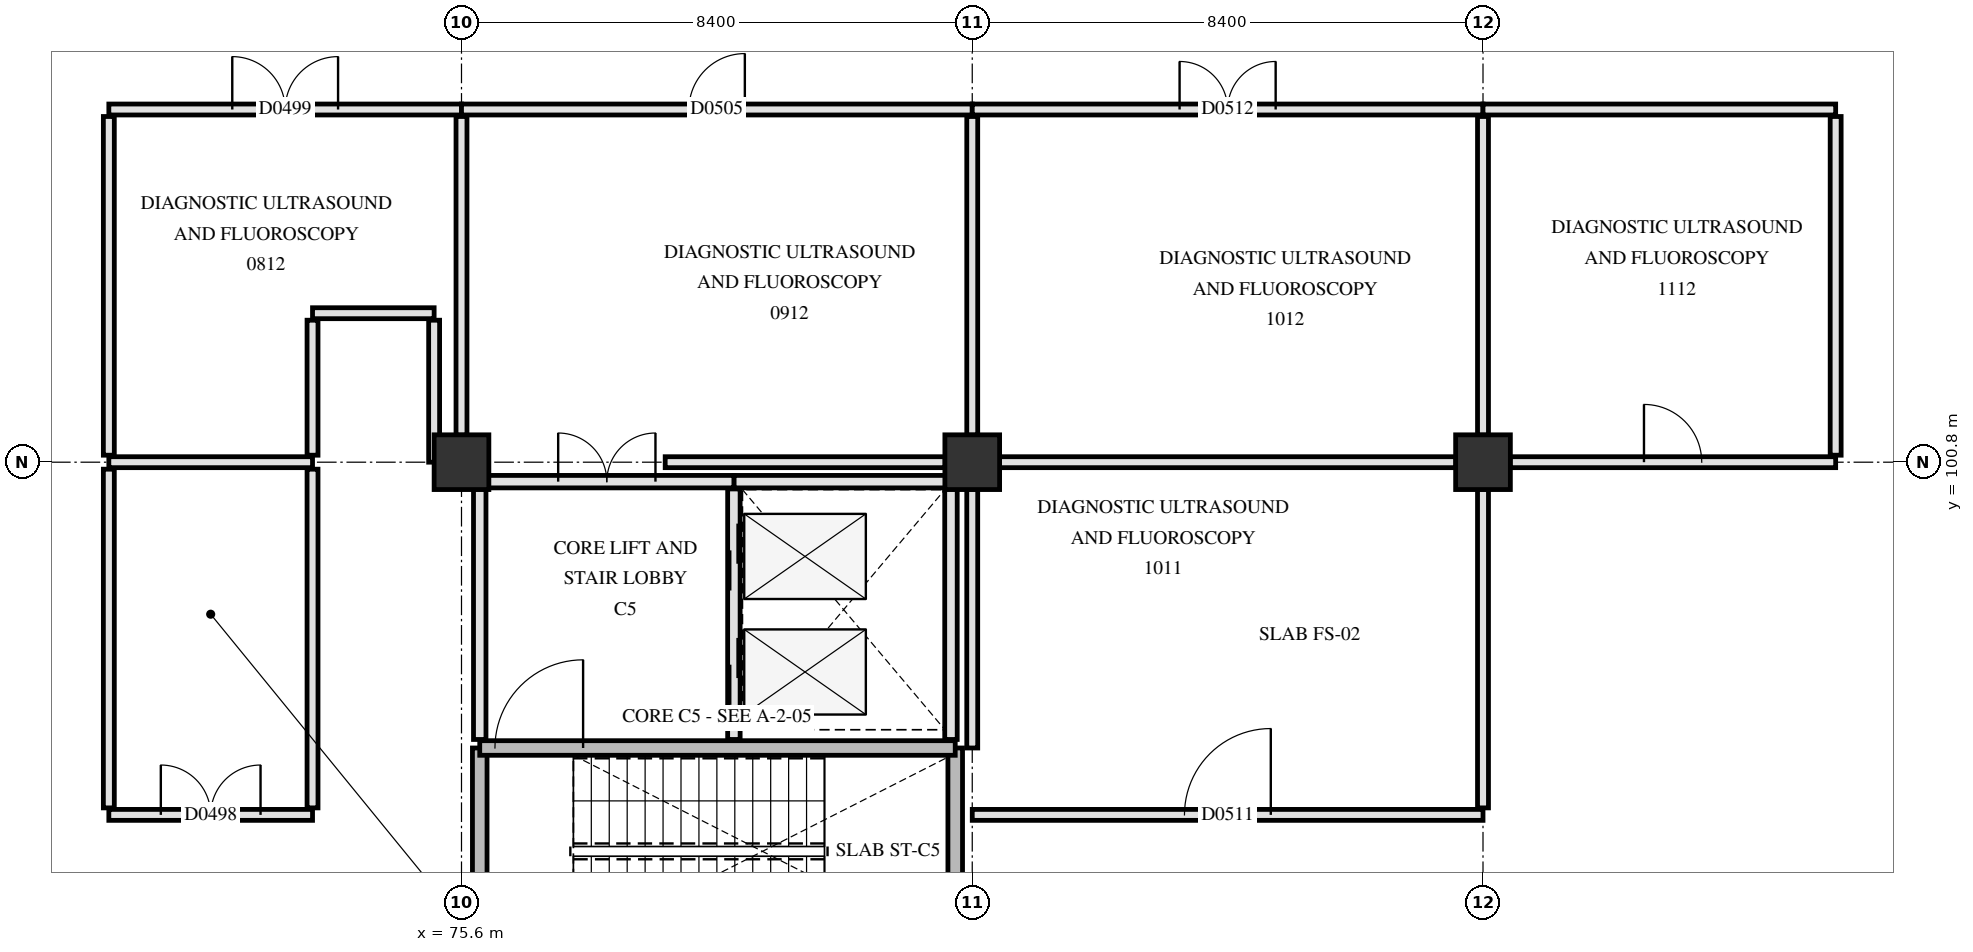
"""IFC4 building model, lengths in metres.
Left out: names, types, materials, properties, quantities, classifications, styles, units other than length and angle.
Written with IfcOpenShell. Run it as: python <this file> out.ifc"""

import sys

from ifc_helpers import new_model, si_unit, direction, frame, frame_2d, origin, origin_2d, place, context, subcontext, project, spatial, rectangle, extrude, element, fill, save


model = new_model("IFC4")
c1 = context("Model", 3, precision=1e-05, world=origin(), true_north=direction((0.0, 1.0)))
c2 = subcontext(c1, "Body", "Model", "MODEL_VIEW")
j1 = project(units=[si_unit("LENGTHUNIT", "METRE"), si_unit("PLANEANGLEUNIT", "RADIAN")], contexts=[c1])
p1 = place(None, origin())
s1 = spatial("IfcSite", under=j1, at=p1, CompositionType="ELEMENT")
p2 = place(p1, origin())
s2 = spatial("IfcBuilding", under=s1, at=p2, CompositionType="ELEMENT")
p3 = place(p2, origin())
s3 = spatial("IfcBuildingStorey", under=s2, at=p3, CompositionType="ELEMENT", Elevation=0.0)
for number, where, z_axis, x_axis in (
    (1, (75.6, 100.8, 0.0), (0.0, 0.0, 1.0), (1.0, 0.0, 0.0)),
    (2, (84.0, 100.8, 0.0), (0.0, 0.0, 1.0), (1.0, 0.0, 0.0)),
    (3, (92.4, 100.8, 0.0), (0.0, 0.0, 1.0), (1.0, 0.0, 0.0)),
):
    element("IfcColumn", number, at=place(p3, frame(where, z_axis=z_axis, x_axis=x_axis)), inside=s3, PredefinedType="COLUMN", context=c2, shape_type="SweptSolid", body=[
        extrude(rectangle(XDim=0.9, YDim=0.9, at=origin_2d()), origin(), (0.0, 0.0, 1.0), 4.8),
    ])
for number, where, z_axis, x_axis in (
    (4, (75.9, 92.78, 0.0), (0.0, 0.0, 1.0), (0.0, 1.0, 0.0)),
    (5, (83.72, 92.78, 0.0), (0.0, 0.0, 1.0), (0.0, 1.0, 0.0)),
):
    element("IfcWall", number, at=place(p3, frame(where, z_axis=z_axis, x_axis=x_axis)), inside=s3, PredefinedType="SHEAR", context=c2, shape_type="SweptSolid", body=[
        extrude(rectangle(XDim=3.32, YDim=0.24, at=frame_2d((1.66, 0.0))), origin(), (0.0, 0.0, 1.0), 4.5),
    ])
p4 = place(p3, frame((75.9, 96.1, 0.0), z_axis=(0.0, 0.0, 1.0), x_axis=(1.0, 0.0, 0.0)))
e6 = element("IfcWall", 6, at=p4, inside=s3, PredefinedType="SHEAR", context=c2, shape_type="SweptSolid", body=[
    extrude(rectangle(XDim=7.82, YDim=0.24, at=frame_2d((3.91, 0.0))), origin(), (0.0, 0.0, 1.0), 4.5),
])
p5 = place(p4, frame((0.25, 0.0, 0.0)))
e7 = element("IfcOpeningElement", 7, at=p5, cuts=e6, PredefinedType="OPENING", context=c2, shape_type="SweptSolid", body=[
    extrude(rectangle(XDim=1.45, YDim=2.2, at=frame_2d((0.725, 1.1))), frame((0.0, 0.13, 0.0), z_axis=(0.0, -1.0, 0.0), x_axis=(1.0, 0.0, 0.0)), (0.0, 0.0, 1.0), 0.26),
])
p6 = place(p3, frame((80.08, 96.24, 0.0), z_axis=(0.0, 0.0, 1.0), x_axis=(0.0, 1.0, 0.0)))
e8 = element("IfcWall", 8, at=p6, inside=s3, PredefinedType="PARTITIONING", context=c2, shape_type="SweptSolid", body=[
    extrude(rectangle(XDim=4.12, YDim=0.205, at=frame_2d((2.06, 0.0))), origin(), (0.0, 0.0, 1.0), 4.49),
])
p7 = place(p6, frame((0.57, 0.0, 0.0)))
e9 = element("IfcOpeningElement", 9, at=p7, cuts=e8, PredefinedType="OPENING", context=c2, shape_type="SweptSolid", body=[
    extrude(rectangle(XDim=1.1, YDim=2.15, at=frame_2d((0.55, 1.075))), frame((0.0, 0.113, 0.0), z_axis=(0.0, -1.0, 0.0), x_axis=(1.0, 0.0, 0.0)), (0.0, 0.0, 1.0), 0.225),
])
p8 = place(p6, frame((2.45, 0.0, 0.0)))
e10 = element("IfcOpeningElement", 10, at=p8, cuts=e8, PredefinedType="OPENING", context=c2, shape_type="SweptSolid", body=[
    extrude(rectangle(XDim=1.1, YDim=2.15, at=frame_2d((0.55, 1.075))), frame((0.0, 0.113, 0.0), z_axis=(0.0, -1.0, 0.0), x_axis=(1.0, 0.0, 0.0)), (0.0, 0.0, 1.0), 0.225),
])
p9 = place(p3, frame((83.65, 96.24, 0.0), z_axis=(0.0, 0.0, 1.0), x_axis=(0.0, 1.0, 0.0)))
e11 = element("IfcWall", 11, at=p9, inside=s3, PredefinedType="PARTITIONING", context=c2, shape_type="SweptSolid", body=[
    extrude(rectangle(XDim=4.12, YDim=0.205, at=frame_2d((2.06, 0.0))), origin(), (0.0, 0.0, 1.0), 4.49),
])
p10 = place(p3, frame((80.08, 100.48, 0.0), z_axis=(0.0, 0.0, 1.0), x_axis=(1.0, 0.0, 0.0)))
e12 = element("IfcWall", 12, at=p10, inside=s3, PredefinedType="PARTITIONING", context=c2, shape_type="SweptSolid", body=[
    extrude(rectangle(XDim=3.57, YDim=0.205, at=frame_2d((1.785, 0.0))), origin(), (0.0, 0.0, 1.0), 3.84),
])
p11 = place(p3, frame((75.9, 96.24, 0.0), z_axis=(0.0, 0.0, 1.0), x_axis=(0.0, 1.0, 0.0)))
e13 = element("IfcWall", 13, at=p11, inside=s3, PredefinedType="PARTITIONING", context=c2, shape_type="SweptSolid", body=[
    extrude(rectangle(XDim=4.12, YDim=0.205, at=frame_2d((2.06, 0.0))), origin(), (0.0, 0.0, 1.0), 3.89),
])
p12 = place(p3, frame((75.9, 100.48, 0.0), z_axis=(0.0, 0.0, 1.0), x_axis=(1.0, 0.0, 0.0)))
e14 = element("IfcWall", 14, at=p12, inside=s3, PredefinedType="PARTITIONING", context=c2, shape_type="SweptSolid", body=[
    extrude(rectangle(XDim=4.18, YDim=0.205, at=frame_2d((2.09, 0.0))), origin(), (0.0, 0.0, 1.0), 3.84),
])
p13 = place(p12, frame((1.29, 0.0, 0.0)))
e15 = element("IfcOpeningElement", 15, at=p13, cuts=e14, PredefinedType="OPENING", context=c2, shape_type="SweptSolid", body=[
    extrude(rectangle(XDim=1.6, YDim=2.25, at=frame_2d((0.8, 1.125))), frame((0.0, 0.113, 0.0), z_axis=(0.0, -1.0, 0.0), x_axis=(1.0, 0.0, 0.0)), (0.0, 0.0, 1.0), 0.225),
])
p14 = place(p3, frame((69.8, 95.0, 0.0), z_axis=(0.0, 0.0, 1.0), x_axis=(1.0, 0.0, 0.0)))
e16 = element("IfcWall", 16, at=p14, inside=s3, PredefinedType="PARTITIONING", context=c2, shape_type="SweptSolid", body=[
    extrude(rectangle(XDim=3.35, YDim=0.18, at=frame_2d((1.675, 0.0))), origin(), (0.0, 0.0, 1.0), 4.49),
])
p15 = place(p14, frame((0.855, 0.0, 0.0)))
e17 = element("IfcOpeningElement", 17, at=p15, cuts=e16, PredefinedType="OPENING", context=c2, shape_type="SweptSolid", body=[
    extrude(rectangle(XDim=1.64, YDim=2.28, at=frame_2d((0.82, 1.14))), frame((0.0, 0.1, 0.0), z_axis=(0.0, -1.0, 0.0), x_axis=(1.0, 0.0, 0.0)), (0.0, 0.0, 1.0), 0.2),
])
p16 = place(p3, frame((84.0, 95.0, 0.0), z_axis=(0.0, 0.0, 1.0), x_axis=(1.0, 0.0, 0.0)))
e18 = element("IfcWall", 18, at=p16, inside=s3, PredefinedType="PARTITIONING", context=c2, shape_type="SweptSolid", body=[
    extrude(rectangle(XDim=8.4, YDim=0.18, at=frame_2d((4.2, 0.0))), origin(), (0.0, 0.0, 1.0), 3.89),
])
p17 = place(p16, frame((3.49, 0.0, 0.0)))
e19 = element("IfcOpeningElement", 19, at=p17, cuts=e18, PredefinedType="OPENING", context=c2, shape_type="SweptSolid", body=[
    extrude(rectangle(XDim=1.42, YDim=2.22, at=frame_2d((0.71, 1.11))), frame((0.0, 0.1, 0.0), z_axis=(0.0, -1.0, 0.0), x_axis=(1.0, 0.0, 0.0)), (0.0, 0.0, 1.0), 0.2),
])
p18 = place(p3, frame((69.8, 100.8, 0.0), z_axis=(0.0, 0.0, 1.0), x_axis=(1.0, 0.0, 0.0)))
e20 = element("IfcWall", 20, at=p18, inside=s3, PredefinedType="PARTITIONING", context=c2, shape_type="SweptSolid", body=[
    extrude(rectangle(XDim=3.35, YDim=0.18, at=frame_2d((1.675, 0.0))), origin(), (0.0, 0.0, 1.0), 3.84),
])
p19 = place(p3, frame((78.95, 100.8, 0.0), z_axis=(0.0, 0.0, 1.0), x_axis=(1.0, 0.0, 0.0)))
e21 = element("IfcWall", 21, at=p19, inside=s3, PredefinedType="PARTITIONING", context=c2, shape_type="SweptSolid", body=[
    extrude(rectangle(XDim=4.605, YDim=0.18, at=frame_2d((2.302, 0.0))), origin(), (0.0, 0.0, 1.0), 3.84),
])
p20 = place(p3, frame((84.445, 100.8, 0.0), z_axis=(0.0, 0.0, 1.0), x_axis=(1.0, 0.0, 0.0)))
e22 = element("IfcWall", 22, at=p20, inside=s3, PredefinedType="PARTITIONING", context=c2, shape_type="SweptSolid", body=[
    extrude(rectangle(XDim=7.51, YDim=0.18, at=frame_2d((3.755, 0.0))), origin(), (0.0, 0.0, 1.0), 3.84),
])
p21 = place(p3, frame((92.845, 100.8, 0.0), z_axis=(0.0, 0.0, 1.0), x_axis=(1.0, 0.0, 0.0)))
e23 = element("IfcWall", 23, at=p21, inside=s3, PredefinedType="PARTITIONING", context=c2, shape_type="SweptSolid", body=[
    extrude(rectangle(XDim=5.355, YDim=0.18, at=frame_2d((2.677, 0.0))), origin(), (0.0, 0.0, 1.0), 3.84),
])
p22 = place(p21, frame((2.202, 0.0, 0.0)))
e24 = element("IfcOpeningElement", 24, at=p22, cuts=e23, PredefinedType="OPENING", context=c2, shape_type="SweptSolid", body=[
    extrude(rectangle(XDim=0.95, YDim=2.1, at=frame_2d((0.475, 1.05))), frame((0.0, 0.1, 0.0), z_axis=(0.0, -1.0, 0.0), x_axis=(1.0, 0.0, 0.0)), (0.0, 0.0, 1.0), 0.2),
])
p23 = place(p3, frame((73.15, 103.25, 0.0), z_axis=(0.0, 0.0, 1.0), x_axis=(1.0, 0.0, 0.0)))
e25 = element("IfcWall", 25, at=p23, inside=s3, PredefinedType="PARTITIONING", context=c2, shape_type="SweptSolid", body=[
    extrude(rectangle(XDim=2.0, YDim=0.18, at=frame_2d((1.0, 0.0))), origin(), (0.0, 0.0, 1.0), 4.49),
])
p24 = place(p3, frame((69.8, 106.6, 0.0), z_axis=(0.0, 0.0, 1.0), x_axis=(1.0, 0.0, 0.0)))
e26 = element("IfcWall", 26, at=p24, inside=s3, PredefinedType="PARTITIONING", context=c2, shape_type="SweptSolid", body=[
    extrude(rectangle(XDim=5.8, YDim=0.18, at=frame_2d((2.9, 0.0))), origin(), (0.0, 0.0, 1.0), 3.89),
])
p25 = place(p24, frame((2.03, 0.0, 0.0)))
e27 = element("IfcOpeningElement", 27, at=p25, cuts=e26, PredefinedType="OPENING", context=c2, shape_type="SweptSolid", body=[
    extrude(rectangle(XDim=1.74, YDim=2.24, at=frame_2d((0.87, 1.12))), frame((0.0, 0.1, 0.0), z_axis=(0.0, -1.0, 0.0), x_axis=(1.0, 0.0, 0.0)), (0.0, 0.0, 1.0), 0.2),
])
p26 = place(p3, frame((75.6, 106.6, 0.0), z_axis=(0.0, 0.0, 1.0), x_axis=(1.0, 0.0, 0.0)))
e28 = element("IfcWall", 28, at=p26, inside=s3, PredefinedType="PARTITIONING", context=c2, shape_type="SweptSolid", body=[
    extrude(rectangle(XDim=8.4, YDim=0.18, at=frame_2d((4.2, 0.0))), origin(), (0.0, 0.0, 1.0), 3.89),
])
p27 = place(p26, frame((3.74, 0.0, 0.0)))
e29 = element("IfcOpeningElement", 29, at=p27, cuts=e28, PredefinedType="OPENING", context=c2, shape_type="SweptSolid", body=[
    extrude(rectangle(XDim=0.92, YDim=2.08, at=frame_2d((0.46, 1.04))), frame((0.0, 0.1, 0.0), z_axis=(0.0, -1.0, 0.0), x_axis=(1.0, 0.0, 0.0)), (0.0, 0.0, 1.0), 0.2),
])
p28 = place(p3, frame((84.0, 106.6, 0.0), z_axis=(0.0, 0.0, 1.0), x_axis=(1.0, 0.0, 0.0)))
e30 = element("IfcWall", 30, at=p28, inside=s3, PredefinedType="PARTITIONING", context=c2, shape_type="SweptSolid", body=[
    extrude(rectangle(XDim=8.4, YDim=0.18, at=frame_2d((4.2, 0.0))), origin(), (0.0, 0.0, 1.0), 3.89),
])
p29 = place(p28, frame((3.41, 0.0, 0.0)))
e31 = element("IfcOpeningElement", 31, at=p29, cuts=e30, PredefinedType="OPENING", context=c2, shape_type="SweptSolid", body=[
    extrude(rectangle(XDim=1.58, YDim=2.22, at=frame_2d((0.79, 1.11))), frame((0.0, 0.1, 0.0), z_axis=(0.0, -1.0, 0.0), x_axis=(1.0, 0.0, 0.0)), (0.0, 0.0, 1.0), 0.2),
])
p30 = place(p3, frame((92.4, 106.6, 0.0), z_axis=(0.0, 0.0, 1.0), x_axis=(1.0, 0.0, 0.0)))
e32 = element("IfcWall", 32, at=p30, inside=s3, PredefinedType="PARTITIONING", context=c2, shape_type="SweptSolid", body=[
    extrude(rectangle(XDim=5.8, YDim=0.18, at=frame_2d((2.9, 0.0))), origin(), (0.0, 0.0, 1.0), 3.89),
])
for number, where, z_axis, x_axis in (
    (33, (69.8, 95.115, 0.0), (0.0, 0.0, 1.0), (0.0, 1.0, 0.0)),
    (34, (69.8, 100.915, 0.0), (0.0, 0.0, 1.0), (0.0, 1.0, 0.0)),
    (35, (73.15, 95.115, 0.0), (0.0, 0.0, 1.0), (0.0, 1.0, 0.0)),
):
    element("IfcWall", number, at=place(p3, frame(where, z_axis=z_axis, x_axis=x_axis)), inside=s3, PredefinedType="PARTITIONING", context=c2, shape_type="SweptSolid", body=[
        extrude(rectangle(XDim=5.57, YDim=0.18, at=frame_2d((2.785, 0.0))), origin(), (0.0, 0.0, 1.0), 3.84),
    ])
p31 = place(p3, frame((73.15, 100.915, 0.0), z_axis=(0.0, 0.0, 1.0), x_axis=(0.0, 1.0, 0.0)))
e36 = element("IfcWall", 36, at=p31, inside=s3, PredefinedType="PARTITIONING", context=c2, shape_type="SweptSolid", body=[
    extrude(rectangle(XDim=2.22, YDim=0.18, at=frame_2d((1.11, 0.0))), origin(), (0.0, 0.0, 1.0), 3.84),
])
p32 = place(p3, frame((75.15, 100.8, 0.0), z_axis=(0.0, 0.0, 1.0), x_axis=(0.0, 1.0, 0.0)))
e37 = element("IfcWall", 37, at=p32, inside=s3, PredefinedType="PARTITIONING", context=c2, shape_type="SweptSolid", body=[
    extrude(rectangle(XDim=2.335, YDim=0.18, at=frame_2d((1.167, 0.0))), origin(), (0.0, 0.0, 1.0), 3.84),
])
p33 = place(p3, frame((75.6, 101.245, 0.0), z_axis=(0.0, 0.0, 1.0), x_axis=(0.0, 1.0, 0.0)))
e38 = element("IfcWall", 38, at=p33, inside=s3, PredefinedType="PARTITIONING", context=c2, shape_type="SweptSolid", body=[
    extrude(rectangle(XDim=5.24, YDim=0.18, at=frame_2d((2.62, 0.0))), origin(), (0.0, 0.0, 1.0), 3.89),
])
p34 = place(p3, frame((84.0, 96.1, 0.0), z_axis=(0.0, 0.0, 1.0), x_axis=(0.0, 1.0, 0.0)))
e39 = element("IfcWall", 39, at=p34, inside=s3, PredefinedType="PARTITIONING", context=c2, shape_type="SweptSolid", body=[
    extrude(rectangle(XDim=4.255, YDim=0.18, at=frame_2d((2.127, 0.0))), origin(), (0.0, 0.0, 1.0), 3.89),
])
for number, where, z_axis, x_axis in (
    (40, (84.0, 101.245, 0.0), (0.0, 0.0, 1.0), (0.0, 1.0, 0.0)),
    (41, (92.4, 95.115, 0.0), (0.0, 0.0, 1.0), (0.0, 1.0, 0.0)),
    (42, (92.4, 101.245, 0.0), (0.0, 0.0, 1.0), (0.0, 1.0, 0.0)),
):
    element("IfcWall", number, at=place(p3, frame(where, z_axis=z_axis, x_axis=x_axis)), inside=s3, PredefinedType="PARTITIONING", context=c2, shape_type="SweptSolid", body=[
        extrude(rectangle(XDim=5.24, YDim=0.18, at=frame_2d((2.62, 0.0))), origin(), (0.0, 0.0, 1.0), 3.89),
    ])
p35 = place(p3, frame((98.2, 100.915, 0.0), z_axis=(0.0, 0.0, 1.0), x_axis=(0.0, 1.0, 0.0)))
e43 = element("IfcWall", 43, at=p35, inside=s3, PredefinedType="PARTITIONING", context=c2, shape_type="SweptSolid", body=[
    extrude(rectangle(XDim=5.57, YDim=0.18, at=frame_2d((2.785, 0.0))), origin(), (0.0, 0.0, 1.0), 3.84),
])
p36 = place(p5, origin())
e44 = element("IfcDoor", 44, at=p36, inside=s3, OperationType="SINGLE_SWING_RIGHT", PredefinedType="DOOR", context=c2, shape_type="SweptSolid", body=[
    extrude(rectangle(XDim=1.45, YDim=2.2, at=frame_2d((0.725, 1.1))), frame((0.0, 0.025, 0.0), z_axis=(0.0, -1.0, 0.0), x_axis=(1.0, 0.0, 0.0)), (0.0, 0.0, 1.0), 0.05),
])
fill(e7, e44)
p37 = place(p7, origin())
e45 = element("IfcDoor", 45, at=p37, inside=s3, OperationType="SLIDING_TO_LEFT", PredefinedType="DOOR", context=c2, shape_type="SweptSolid", body=[
    extrude(rectangle(XDim=1.1, YDim=2.15, at=frame_2d((0.55, 1.075))), frame((0.0, 0.025, 0.0), z_axis=(0.0, -1.0, 0.0), x_axis=(1.0, 0.0, 0.0)), (0.0, 0.0, 1.0), 0.05),
])
fill(e9, e45)
p38 = place(p8, origin())
e46 = element("IfcDoor", 46, at=p38, inside=s3, OperationType="SLIDING_TO_LEFT", PredefinedType="DOOR", context=c2, shape_type="SweptSolid", body=[
    extrude(rectangle(XDim=1.1, YDim=2.15, at=frame_2d((0.55, 1.075))), frame((0.0, 0.025, 0.0), z_axis=(0.0, -1.0, 0.0), x_axis=(1.0, 0.0, 0.0)), (0.0, 0.0, 1.0), 0.05),
])
fill(e10, e46)
p39 = place(p13, origin())
e47 = element("IfcDoor", 47, at=p39, inside=s3, OperationType="DOUBLE_SWING_LEFT", PredefinedType="DOOR", context=c2, shape_type="SweptSolid", body=[
    extrude(rectangle(XDim=1.6, YDim=2.25, at=frame_2d((0.8, 1.125))), frame((0.0, 0.025, 0.0), z_axis=(0.0, -1.0, 0.0), x_axis=(1.0, 0.0, 0.0)), (0.0, 0.0, 1.0), 0.05),
])
fill(e15, e47)
p40 = place(p15, origin())
e48 = element("IfcDoor", 48, at=p40, inside=s3, OperationType="DOUBLE_SWING_LEFT", PredefinedType="DOOR", context=c2, shape_type="SweptSolid", body=[
    extrude(rectangle(XDim=1.64, YDim=2.28, at=frame_2d((0.82, 1.14))), frame((0.0, 0.025, 0.0), z_axis=(0.0, -1.0, 0.0), x_axis=(1.0, 0.0, 0.0)), (0.0, 0.0, 1.0), 0.05),
])
fill(e17, e48)
p41 = place(p25, origin())
e49 = element("IfcDoor", 49, at=p41, inside=s3, OperationType="DOUBLE_SWING_RIGHT", PredefinedType="DOOR", context=c2, shape_type="SweptSolid", body=[
    extrude(rectangle(XDim=1.74, YDim=2.24, at=frame_2d((0.87, 1.12))), frame((0.0, 0.025, 0.0), z_axis=(0.0, -1.0, 0.0), x_axis=(1.0, 0.0, 0.0)), (0.0, 0.0, 1.0), 0.05),
])
fill(e27, e49)
p42 = place(p27, origin())
e50 = element("IfcDoor", 50, at=p42, inside=s3, OperationType="SINGLE_SWING_RIGHT", PredefinedType="DOOR", context=c2, shape_type="SweptSolid", body=[
    extrude(rectangle(XDim=0.92, YDim=2.08, at=frame_2d((0.46, 1.04))), frame((0.0, 0.025, 0.0), z_axis=(0.0, -1.0, 0.0), x_axis=(1.0, 0.0, 0.0)), (0.0, 0.0, 1.0), 0.05),
])
fill(e29, e50)
p43 = place(p17, origin())
e51 = element("IfcDoor", 51, at=p43, inside=s3, OperationType="SINGLE_SWING_RIGHT", PredefinedType="DOOR", context=c2, shape_type="SweptSolid", body=[
    extrude(rectangle(XDim=1.42, YDim=2.22, at=frame_2d((0.71, 1.11))), frame((0.0, 0.025, 0.0), z_axis=(0.0, -1.0, 0.0), x_axis=(1.0, 0.0, 0.0)), (0.0, 0.0, 1.0), 0.05),
])
fill(e19, e51)
p44 = place(p29, origin())
e52 = element("IfcDoor", 52, at=p44, inside=s3, OperationType="DOUBLE_SWING_LEFT", PredefinedType="DOOR", context=c2, shape_type="SweptSolid", body=[
    extrude(rectangle(XDim=1.58, YDim=2.22, at=frame_2d((0.79, 1.11))), frame((0.0, 0.025, 0.0), z_axis=(0.0, -1.0, 0.0), x_axis=(1.0, 0.0, 0.0)), (0.0, 0.0, 1.0), 0.05),
])
fill(e31, e52)
p45 = place(p22, origin())
e53 = element("IfcDoor", 53, at=p45, inside=s3, OperationType="SINGLE_SWING_LEFT", PredefinedType="DOOR", context=c2, shape_type="SweptSolid", body=[
    extrude(rectangle(XDim=0.95, YDim=2.1, at=frame_2d((0.475, 1.05))), frame((0.0, 0.025, 0.0), z_axis=(0.0, -1.0, 0.0), x_axis=(1.0, 0.0, 0.0)), (0.0, 0.0, 1.0), 0.05),
])
fill(e24, e53)
save(model, sys.argv[1])
